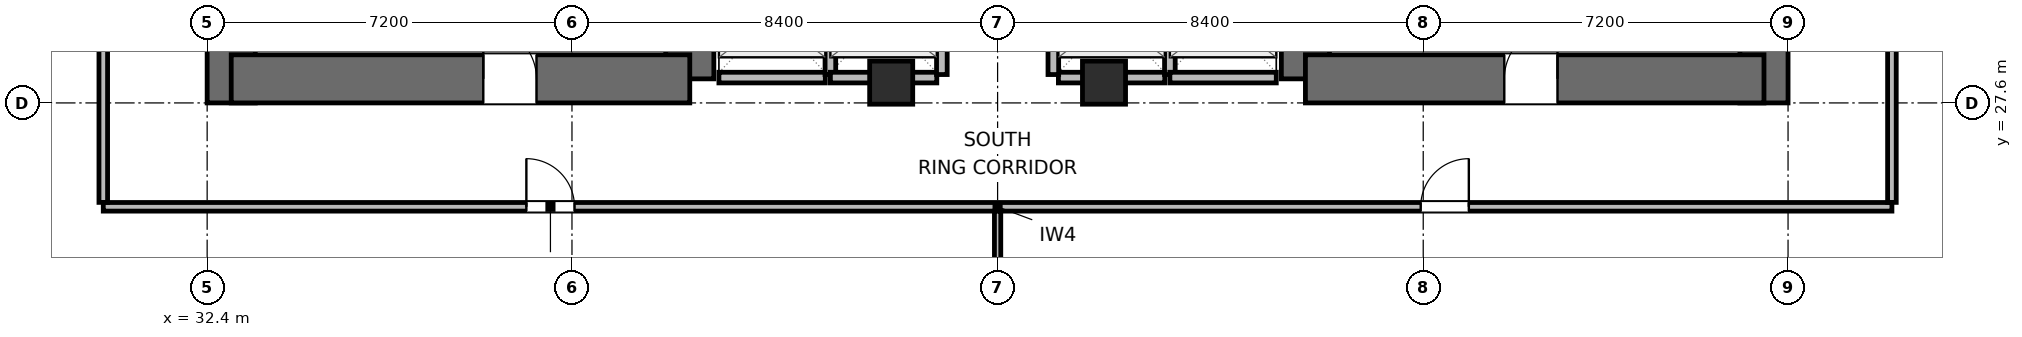
"""IFC4 building model, lengths in metres.
Left out: names, types, materials, properties, quantities, classifications, styles, units other than length and angle.
Written with IfcOpenShell. Run it as: python <this file> out.ifc"""

import sys

from ifc_helpers import new_model, si_unit, direction, frame, frame_2d, origin, origin_2d, place, context, subcontext, project, spatial, rectangle, extrude, element, fill, save


model = new_model("IFC4")
c1 = context("Model", 3, precision=1e-05, world=origin(), true_north=direction((0.0, 1.0)))
c2 = subcontext(c1, "Body", "Model", "MODEL_VIEW")
j1 = project(units=[si_unit("LENGTHUNIT", "METRE"), si_unit("PLANEANGLEUNIT", "RADIAN")], contexts=[c1])
p1 = place(None, origin())
s1 = spatial("IfcSite", under=j1, at=p1, CompositionType="ELEMENT")
p2 = place(p1, origin())
s2 = spatial("IfcBuilding", under=s1, at=p2, CompositionType="ELEMENT")
p3 = place(p2, frame((0.0, 0.0, 25.5)))
s3 = spatial("IfcBuildingStorey", under=s2, at=p3, CompositionType="ELEMENT", Elevation=25.5)
p4 = place(p3, frame((32.875, 27.6, 0.0), z_axis=(0.0, 0.0, 1.0), x_axis=(0.0, 1.0, 0.0)))
e1 = element("IfcWall", 1, at=p4, inside=s3, PredefinedType="SHEAR", context=c2, shape_type="SweptSolid", body=[
    extrude(rectangle(XDim=16.8, YDim=0.95, at=frame_2d((8.4, 0.0))), origin(), (0.0, 0.0, 1.0), 3.9),
])
p5 = place(p3, frame((41.925, 28.075, 0.0), z_axis=(0.0, 0.0, 1.0), x_axis=(0.0, 1.0, 0.0)))
e2 = element("IfcWall", 2, at=p5, inside=s3, PredefinedType="SHEAR", context=c2, shape_type="SweptSolid", body=[
    extrude(rectangle(XDim=6.325, YDim=0.95, at=frame_2d((3.163, 0.0))), origin(), (0.0, 0.0, 1.0), 3.9),
])
p6 = place(p3, frame((32.875, 28.075, 0.0), z_axis=(0.0, 0.0, 1.0), x_axis=(1.0, 0.0, 0.0)))
e3 = element("IfcWall", 3, at=p6, inside=s3, PredefinedType="SHEAR", context=c2, shape_type="SweptSolid", body=[
    extrude(rectangle(XDim=9.05, YDim=0.95, at=frame_2d((4.525, 0.0))), origin(), (0.0, 0.0, 1.0), 3.9),
])
p7 = place(p6, frame((4.975, 0.0, 0.0)))
e4 = element("IfcOpeningElement", 4, at=p7, cuts=e3, PredefinedType="OPENING", context=c2, shape_type="SweptSolid", body=[
    extrude(rectangle(XDim=1.05, YDim=2.04, at=frame_2d((0.525, 1.02))), frame((0.0, 0.485, 0.0), z_axis=(0.0, -1.0, 0.0), x_axis=(1.0, 0.0, 0.0)), (0.0, 0.0, 1.0), 0.97),
])
p8 = place(p3, frame((54.075, 28.075, 0.0), z_axis=(0.0, 0.0, 1.0), x_axis=(0.0, 1.0, 0.0)))
e5 = element("IfcWall", 5, at=p8, inside=s3, PredefinedType="SHEAR", context=c2, shape_type="SweptSolid", body=[
    extrude(rectangle(XDim=7.725, YDim=0.95, at=frame_2d((3.863, 0.0))), origin(), (0.0, 0.0, 1.0), 3.9),
])
p9 = place(p3, frame((63.125, 27.6, 0.0), z_axis=(0.0, 0.0, 1.0), x_axis=(0.0, 1.0, 0.0)))
e6 = element("IfcWall", 6, at=p9, inside=s3, PredefinedType="SHEAR", context=c2, shape_type="SweptSolid", body=[
    extrude(rectangle(XDim=16.8, YDim=0.95, at=frame_2d((8.4, 0.0))), origin(), (0.0, 0.0, 1.0), 3.9),
])
p10 = place(p3, frame((54.075, 28.075, 0.0), z_axis=(0.0, 0.0, 1.0), x_axis=(1.0, 0.0, 0.0)))
e7 = element("IfcWall", 7, at=p10, inside=s3, PredefinedType="SHEAR", context=c2, shape_type="SweptSolid", body=[
    extrude(rectangle(XDim=9.05, YDim=0.95, at=frame_2d((4.525, 0.0))), origin(), (0.0, 0.0, 1.0), 3.9),
])
p11 = place(p10, frame((3.925, 0.0, 0.0)))
e8 = element("IfcOpeningElement", 8, at=p11, cuts=e7, PredefinedType="OPENING", context=c2, shape_type="SweptSolid", body=[
    extrude(rectangle(XDim=1.05, YDim=2.04, at=frame_2d((0.525, 1.02))), frame((0.0, 0.485, 0.0), z_axis=(0.0, -1.0, 0.0), x_axis=(1.0, 0.0, 0.0)), (0.0, 0.0, 1.0), 0.97),
])
for number, where, z_axis, x_axis in (
    (9, (45.9, 28.0, 0.0), (0.0, 0.0, 1.0), (1.0, 0.0, 0.0)),
    (10, (50.1, 28.0, 0.0), (0.0, 0.0, 1.0), (1.0, 0.0, 0.0)),
):
    element("IfcColumn", number, at=place(p3, frame(where, z_axis=z_axis, x_axis=x_axis)), inside=s3, PredefinedType="COLUMN", context=c2, shape_type="SweptSolid", body=[
        extrude(rectangle(XDim=0.85, YDim=0.85, at=origin_2d()), origin(), (0.0, 0.0, 1.0), 3.9),
    ])
p12 = place(p3, frame((42.5, 28.1, 0.0), z_axis=(0.0, 0.0, 1.0), x_axis=(1.0, 0.0, 0.0)))
e11 = element("IfcWall", 11, at=p12, inside=s3, PredefinedType="PARTITIONING", context=c2, shape_type="SweptSolid", body=[
    extrude(rectangle(XDim=2.1, YDim=0.21, at=frame_2d((1.05, 0.0))), origin(), (0.0, 0.0, 1.0), 2.525),
])
p13 = place(p3, frame((44.7, 28.16, 0.0), z_axis=(0.0, 0.0, 1.0), x_axis=(0.0, 1.0, 0.0)))
e12 = element("IfcWall", 12, at=p13, inside=s3, PredefinedType="PARTITIONING", context=c2, shape_type="SweptSolid", body=[
    extrude(rectangle(XDim=2.28, YDim=0.21, at=frame_2d((1.14, 0.0))), origin(), (0.0, 0.0, 1.0), 3.64),
])
p14 = place(p3, frame((44.7, 28.1, 0.0), z_axis=(0.0, 0.0, 1.0), x_axis=(1.0, 0.0, 0.0)))
e13 = element("IfcWall", 13, at=p14, inside=s3, PredefinedType="PARTITIONING", context=c2, shape_type="SweptSolid", body=[
    extrude(rectangle(XDim=2.1, YDim=0.21, at=frame_2d((1.05, 0.0))), origin(), (0.0, 0.0, 1.0), 2.525),
])
p15 = place(p3, frame((46.9, 28.16, 0.0), z_axis=(0.0, 0.0, 1.0), x_axis=(0.0, 1.0, 0.0)))
e14 = element("IfcWall", 14, at=p15, inside=s3, PredefinedType="PARTITIONING", context=c2, shape_type="SweptSolid", body=[
    extrude(rectangle(XDim=2.28, YDim=0.21, at=frame_2d((1.14, 0.0))), origin(), (0.0, 0.0, 1.0), 3.64),
])
p16 = place(p3, frame((49.2, 28.1, 0.0), z_axis=(0.0, 0.0, 1.0), x_axis=(1.0, 0.0, 0.0)))
e15 = element("IfcWall", 15, at=p16, inside=s3, PredefinedType="PARTITIONING", context=c2, shape_type="SweptSolid", body=[
    extrude(rectangle(XDim=2.1, YDim=0.21, at=frame_2d((1.05, 0.0))), origin(), (0.0, 0.0, 1.0), 2.525),
])
for number, where, z_axis, x_axis in (
    (16, (49.1, 28.16, 0.0), (0.0, 0.0, 1.0), (0.0, 1.0, 0.0)),
    (17, (51.4, 28.16, 0.0), (0.0, 0.0, 1.0), (0.0, 1.0, 0.0)),
):
    element("IfcWall", number, at=place(p3, frame(where, z_axis=z_axis, x_axis=x_axis)), inside=s3, PredefinedType="PARTITIONING", context=c2, shape_type="SweptSolid", body=[
        extrude(rectangle(XDim=2.28, YDim=0.21, at=frame_2d((1.14, 0.0))), origin(), (0.0, 0.0, 1.0), 3.64),
    ])
p17 = place(p3, frame((51.4, 28.1, 0.0), z_axis=(0.0, 0.0, 1.0), x_axis=(1.0, 0.0, 0.0)))
e18 = element("IfcWall", 18, at=p17, inside=s3, PredefinedType="PARTITIONING", context=c2, shape_type="SweptSolid", body=[
    extrude(rectangle(XDim=2.1, YDim=0.21, at=frame_2d((1.05, 0.0))), origin(), (0.0, 0.0, 1.0), 2.525),
])
p18 = place(p3, frame((30.35, 25.55, 0.0), z_axis=(0.0, 0.0, 1.0), x_axis=(1.0, 0.0, 0.0)))
e19 = element("IfcWall", 19, at=p18, inside=s3, PredefinedType="PARTITIONING", context=c2, shape_type="SweptSolid", body=[
    extrude(rectangle(XDim=35.3, YDim=0.17, at=frame_2d((17.65, 0.0))), origin(), (0.0, 0.0, 1.0), 3.64),
])
p19 = place(p18, frame((8.35, 0.0, 0.0)))
e20 = element("IfcOpeningElement", 20, at=p19, cuts=e19, PredefinedType="OPENING", context=c2, shape_type="SweptSolid", body=[
    extrude(rectangle(XDim=0.95, YDim=2.04, at=frame_2d((0.475, 1.02))), frame((0.0, 0.095, 0.0), z_axis=(0.0, -1.0, 0.0), x_axis=(1.0, 0.0, 0.0)), (0.0, 0.0, 1.0), 0.19),
])
p20 = place(p18, frame((26.0, 0.0, 0.0)))
e21 = element("IfcOpeningElement", 21, at=p20, cuts=e19, PredefinedType="OPENING", context=c2, shape_type="SweptSolid", body=[
    extrude(rectangle(XDim=0.95, YDim=2.04, at=frame_2d((0.475, 1.02))), frame((0.0, 0.095, 0.0), z_axis=(0.0, -1.0, 0.0), x_axis=(1.0, 0.0, 0.0)), (0.0, 0.0, 1.0), 0.19),
])
p21 = place(p3, frame((30.35, 25.637, 0.0), z_axis=(0.0, 0.0, 1.0), x_axis=(0.0, 1.0, 0.0)))
e22 = element("IfcWall", 22, at=p21, inside=s3, PredefinedType="PARTITIONING", context=c2, shape_type="SweptSolid", body=[
    extrude(rectangle(XDim=20.726, YDim=0.17, at=frame_2d((10.363, 0.0))), origin(), (0.0, 0.0, 1.0), 3.64),
])
p22 = place(p21, frame((4.263, 0.0, 0.0)))
e23 = element("IfcOpeningElement", 23, at=p22, cuts=e22, PredefinedType="OPENING", context=c2, shape_type="SweptSolid", body=[
    extrude(rectangle(XDim=0.95, YDim=2.04, at=frame_2d((0.475, 1.02))), frame((0.0, 0.095, 0.0), z_axis=(0.0, -1.0, 0.0), x_axis=(1.0, 0.0, 0.0)), (0.0, 0.0, 1.0), 0.19),
])
p23 = place(p21, frame((14.713, 0.0, 0.0)))
e24 = element("IfcOpeningElement", 24, at=p23, cuts=e22, PredefinedType="OPENING", context=c2, shape_type="SweptSolid", body=[
    extrude(rectangle(XDim=0.95, YDim=2.04, at=frame_2d((0.475, 1.02))), frame((0.0, 0.095, 0.0), z_axis=(0.0, -1.0, 0.0), x_axis=(1.0, 0.0, 0.0)), (0.0, 0.0, 1.0), 0.19),
])
p24 = place(p3, frame((65.65, 25.637, 0.0), z_axis=(0.0, 0.0, 1.0), x_axis=(0.0, 1.0, 0.0)))
e25 = element("IfcWall", 25, at=p24, inside=s3, PredefinedType="PARTITIONING", context=c2, shape_type="SweptSolid", body=[
    extrude(rectangle(XDim=20.726, YDim=0.17, at=frame_2d((10.363, 0.0))), origin(), (0.0, 0.0, 1.0), 3.64),
])
p25 = place(p24, frame((4.163, 0.0, 0.0)))
e26 = element("IfcOpeningElement", 26, at=p25, cuts=e25, PredefinedType="OPENING", context=c2, shape_type="SweptSolid", body=[
    extrude(rectangle(XDim=0.95, YDim=2.04, at=frame_2d((0.475, 1.02))), frame((0.0, 0.095, 0.0), z_axis=(0.0, -1.0, 0.0), x_axis=(1.0, 0.0, 0.0)), (0.0, 0.0, 1.0), 0.19),
])
p26 = place(p24, frame((14.613, 0.0, 0.0)))
e27 = element("IfcOpeningElement", 27, at=p26, cuts=e25, PredefinedType="OPENING", context=c2, shape_type="SweptSolid", body=[
    extrude(rectangle(XDim=0.95, YDim=2.04, at=frame_2d((0.475, 1.02))), frame((0.0, 0.095, 0.0), z_axis=(0.0, -1.0, 0.0), x_axis=(1.0, 0.0, 0.0)), (0.0, 0.0, 1.0), 0.19),
])
p27 = place(p3, frame((48.0, 11.515, 0.0), z_axis=(0.0, 0.0, 1.0), x_axis=(0.0, 1.0, 0.0)))
e28 = element("IfcWall", 28, at=p27, inside=s3, PredefinedType="PARTITIONING", context=c2, shape_type="SweptSolid", body=[
    extrude(rectangle(XDim=13.948, YDim=0.125, at=frame_2d((6.974, 0.0))), origin(), (0.0, 0.0, 1.0), 2.93),
])
p28 = place(p7, origin())
e29 = element("IfcDoor", 29, at=p28, inside=s3, OperationType="SINGLE_SWING_LEFT", PredefinedType="DOOR", context=c2, shape_type="SweptSolid", body=[
    extrude(rectangle(XDim=1.05, YDim=2.04, at=frame_2d((0.525, 1.02))), frame((0.0, 0.025, 0.0), z_axis=(0.0, -1.0, 0.0), x_axis=(1.0, 0.0, 0.0)), (0.0, 0.0, 1.0), 0.05),
])
fill(e4, e29)
p29 = place(p11, origin())
e30 = element("IfcDoor", 30, at=p29, inside=s3, OperationType="SINGLE_SWING_RIGHT", PredefinedType="DOOR", context=c2, shape_type="SweptSolid", body=[
    extrude(rectangle(XDim=1.05, YDim=2.04, at=frame_2d((0.525, 1.02))), frame((0.0, 0.025, 0.0), z_axis=(0.0, -1.0, 0.0), x_axis=(1.0, 0.0, 0.0)), (0.0, 0.0, 1.0), 0.05),
])
fill(e8, e30)
p30 = place(p19, origin())
e31 = element("IfcDoor", 31, at=p30, inside=s3, OperationType="SINGLE_SWING_LEFT", PredefinedType="DOOR", context=c2, shape_type="SweptSolid", body=[
    extrude(rectangle(XDim=0.95, YDim=2.04, at=frame_2d((0.475, 1.02))), frame((0.0, 0.025, 0.0), z_axis=(0.0, -1.0, 0.0), x_axis=(1.0, 0.0, 0.0)), (0.0, 0.0, 1.0), 0.05),
])
fill(e20, e31)
p31 = place(p20, origin())
e32 = element("IfcDoor", 32, at=p31, inside=s3, OperationType="SINGLE_SWING_RIGHT", PredefinedType="DOOR", context=c2, shape_type="SweptSolid", body=[
    extrude(rectangle(XDim=0.95, YDim=2.04, at=frame_2d((0.475, 1.02))), frame((0.0, 0.025, 0.0), z_axis=(0.0, -1.0, 0.0), x_axis=(1.0, 0.0, 0.0)), (0.0, 0.0, 1.0), 0.05),
])
fill(e21, e32)
save(model, sys.argv[1])
